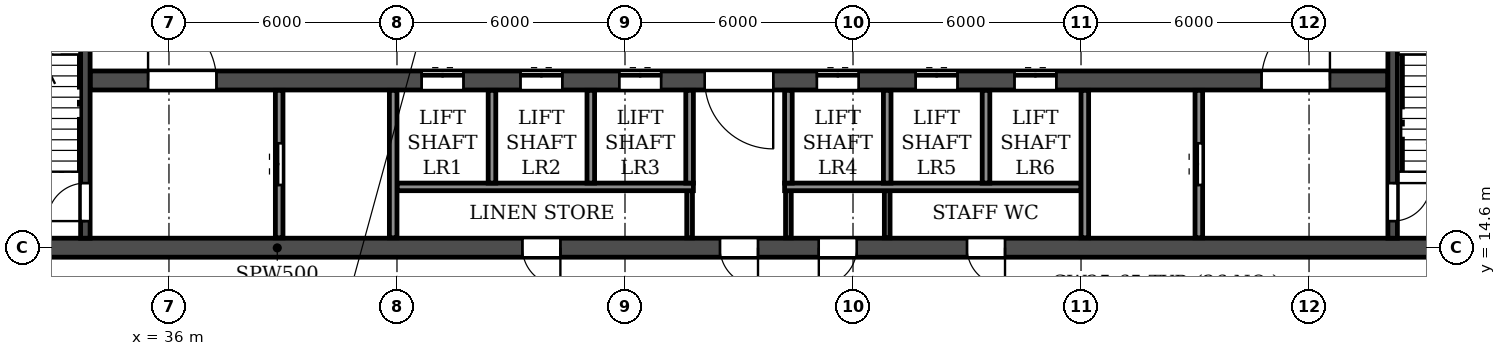
"""IFC4 building model, lengths in metres.
Left out: names, types, materials, properties, quantities, classifications, styles, units other than length and angle.
Written with IfcOpenShell. Run it as: python <this file> out.ifc"""

import sys

from ifc_helpers import new_model, si_unit, direction, frame, frame_2d, origin, place, context, subcontext, project, spatial, rectangle, extrude, element, fill, save


model = new_model("IFC4")
c1 = context("Model", 3, precision=1e-05, world=origin(), true_north=direction((0.0, 1.0)))
c2 = subcontext(c1, "Body", "Model", "MODEL_VIEW")
j1 = project(units=[si_unit("LENGTHUNIT", "METRE"), si_unit("PLANEANGLEUNIT", "RADIAN")], contexts=[c1])
p1 = place(None, origin())
s1 = spatial("IfcSite", under=j1, at=p1, CompositionType="ELEMENT")
p2 = place(p1, origin())
s2 = spatial("IfcBuilding", under=s1, at=p2, CompositionType="ELEMENT")
p3 = place(p2, frame((0.0, 0.0, 82.8)))
s3 = spatial("IfcBuildingStorey", under=s2, at=p3, CompositionType="ELEMENT", Elevation=82.8)
p4 = place(p3, frame((8.6, 14.6, 0.0), z_axis=(0.0, 0.0, 1.0), x_axis=(1.0, 0.0, 0.0)))
e1 = element("IfcWall", 1, at=p4, inside=s3, PredefinedType="SOLIDWALL", context=c2, shape_type="SweptSolid", body=[
    extrude(rectangle(XDim=84.8, YDim=0.5, at=frame_2d((42.4, 0.0))), origin(), (0.0, 0.0, 1.0), 3.06),
])
p5 = place(p4, frame((1.2, 0.0, 0.0)))
e2 = element("IfcOpeningElement", 2, at=p5, cuts=e1, PredefinedType="OPENING", context=c2, shape_type="SweptSolid", body=[
    extrude(rectangle(XDim=1.0, YDim=2.1, at=frame_2d((0.5, 1.05))), frame((0.0, 0.26, 0.0), z_axis=(0.0, -1.0, 0.0), x_axis=(1.0, 0.0, 0.0)), (0.0, 0.0, 1.0), 0.52),
])
p6 = place(p4, frame((5.9, 0.0, 0.0)))
e3 = element("IfcOpeningElement", 3, at=p6, cuts=e1, PredefinedType="OPENING", context=c2, shape_type="SweptSolid", body=[
    extrude(rectangle(XDim=1.0, YDim=2.1, at=frame_2d((0.5, 1.05))), frame((0.0, 0.26, 0.0), z_axis=(0.0, -1.0, 0.0), x_axis=(1.0, 0.0, 0.0)), (0.0, 0.0, 1.0), 0.52),
])
p7 = place(p4, frame((10.3, 0.0, 0.0)))
e4 = element("IfcOpeningElement", 4, at=p7, cuts=e1, PredefinedType="OPENING", context=c2, shape_type="SweptSolid", body=[
    extrude(rectangle(XDim=1.0, YDim=2.1, at=frame_2d((0.5, 1.05))), frame((0.0, 0.26, 0.0), z_axis=(0.0, -1.0, 0.0), x_axis=(1.0, 0.0, 0.0)), (0.0, 0.0, 1.0), 0.52),
])
p8 = place(p4, frame((18.2, 0.0, 0.0)))
e5 = element("IfcOpeningElement", 5, at=p8, cuts=e1, PredefinedType="OPENING", context=c2, shape_type="SweptSolid", body=[
    extrude(rectangle(XDim=1.0, YDim=2.1, at=frame_2d((0.5, 1.05))), frame((0.0, 0.26, 0.0), z_axis=(0.0, -1.0, 0.0), x_axis=(1.0, 0.0, 0.0)), (0.0, 0.0, 1.0), 0.52),
])
p9 = place(p4, frame((22.8, 0.0, 0.0)))
e6 = element("IfcOpeningElement", 6, at=p9, cuts=e1, PredefinedType="OPENING", context=c2, shape_type="SweptSolid", body=[
    extrude(rectangle(XDim=1.0, YDim=2.1, at=frame_2d((0.5, 1.05))), frame((0.0, 0.26, 0.0), z_axis=(0.0, -1.0, 0.0), x_axis=(1.0, 0.0, 0.0)), (0.0, 0.0, 1.0), 0.52),
])
p10 = place(p4, frame((36.7, 0.0, 0.0)))
e7 = element("IfcOpeningElement", 7, at=p10, cuts=e1, PredefinedType="OPENING", context=c2, shape_type="SweptSolid", body=[
    extrude(rectangle(XDim=1.0, YDim=2.1, at=frame_2d((0.5, 1.05))), frame((0.0, 0.26, 0.0), z_axis=(0.0, -1.0, 0.0), x_axis=(1.0, 0.0, 0.0)), (0.0, 0.0, 1.0), 0.52),
])
p11 = place(p4, frame((41.9, 0.0, 0.0)))
e8 = element("IfcOpeningElement", 8, at=p11, cuts=e1, PredefinedType="OPENING", context=c2, shape_type="SweptSolid", body=[
    extrude(rectangle(XDim=1.0, YDim=2.1, at=frame_2d((0.5, 1.05))), frame((0.0, 0.26, 0.0), z_axis=(0.0, -1.0, 0.0), x_axis=(1.0, 0.0, 0.0)), (0.0, 0.0, 1.0), 0.52),
])
p12 = place(p4, frame((44.5, 0.0, 0.0)))
e9 = element("IfcOpeningElement", 9, at=p12, cuts=e1, PredefinedType="OPENING", context=c2, shape_type="SweptSolid", body=[
    extrude(rectangle(XDim=1.0, YDim=2.1, at=frame_2d((0.5, 1.05))), frame((0.0, 0.26, 0.0), z_axis=(0.0, -1.0, 0.0), x_axis=(1.0, 0.0, 0.0)), (0.0, 0.0, 1.0), 0.52),
])
p13 = place(p4, frame((48.4, 0.0, 0.0)))
e10 = element("IfcOpeningElement", 10, at=p13, cuts=e1, PredefinedType="OPENING", context=c2, shape_type="SweptSolid", body=[
    extrude(rectangle(XDim=1.0, YDim=2.1, at=frame_2d((0.5, 1.05))), frame((0.0, 0.26, 0.0), z_axis=(0.0, -1.0, 0.0), x_axis=(1.0, 0.0, 0.0)), (0.0, 0.0, 1.0), 0.52),
])
p14 = place(p4, frame((61.0, 0.0, 0.0)))
e11 = element("IfcOpeningElement", 11, at=p14, cuts=e1, PredefinedType="OPENING", context=c2, shape_type="SweptSolid", body=[
    extrude(rectangle(XDim=1.0, YDim=2.1, at=frame_2d((0.5, 1.05))), frame((0.0, 0.26, 0.0), z_axis=(0.0, -1.0, 0.0), x_axis=(1.0, 0.0, 0.0)), (0.0, 0.0, 1.0), 0.52),
])
p15 = place(p4, frame((65.6, 0.0, 0.0)))
e12 = element("IfcOpeningElement", 12, at=p15, cuts=e1, PredefinedType="OPENING", context=c2, shape_type="SweptSolid", body=[
    extrude(rectangle(XDim=1.0, YDim=2.1, at=frame_2d((0.5, 1.05))), frame((0.0, 0.26, 0.0), z_axis=(0.0, -1.0, 0.0), x_axis=(1.0, 0.0, 0.0)), (0.0, 0.0, 1.0), 0.52),
])
p16 = place(p4, frame((73.5, 0.0, 0.0)))
e13 = element("IfcOpeningElement", 13, at=p16, cuts=e1, PredefinedType="OPENING", context=c2, shape_type="SweptSolid", body=[
    extrude(rectangle(XDim=1.0, YDim=2.1, at=frame_2d((0.5, 1.05))), frame((0.0, 0.26, 0.0), z_axis=(0.0, -1.0, 0.0), x_axis=(1.0, 0.0, 0.0)), (0.0, 0.0, 1.0), 0.52),
])
p17 = place(p4, frame((77.3, 0.0, 0.0)))
e14 = element("IfcOpeningElement", 14, at=p17, cuts=e1, PredefinedType="OPENING", context=c2, shape_type="SweptSolid", body=[
    extrude(rectangle(XDim=1.0, YDim=2.1, at=frame_2d((0.5, 1.05))), frame((0.0, 0.26, 0.0), z_axis=(0.0, -1.0, 0.0), x_axis=(1.0, 0.0, 0.0)), (0.0, 0.0, 1.0), 0.52),
])
p18 = place(p4, frame((82.0, 0.0, 0.0)))
e15 = element("IfcOpeningElement", 15, at=p18, cuts=e1, PredefinedType="OPENING", context=c2, shape_type="SweptSolid", body=[
    extrude(rectangle(XDim=1.0, YDim=2.1, at=frame_2d((0.5, 1.05))), frame((0.0, 0.26, 0.0), z_axis=(0.0, -1.0, 0.0), x_axis=(1.0, 0.0, 0.0)), (0.0, 0.0, 1.0), 0.52),
])
p19 = place(p3, frame((33.925, 19.0, 0.0), z_axis=(0.0, 0.0, 1.0), x_axis=(1.0, 0.0, 0.0)))
e16 = element("IfcWall", 16, at=p19, inside=s3, PredefinedType="SOLIDWALL", context=c2, shape_type="SweptSolid", body=[
    extrude(rectangle(XDim=34.15, YDim=0.5, at=frame_2d((17.075, 0.0))), origin(), (0.0, 0.0, 1.0), 3.06),
])
p20 = place(p19, frame((16.175, 0.0, 0.0)))
e17 = element("IfcOpeningElement", 17, at=p20, cuts=e16, PredefinedType="OPENING", context=c2, shape_type="SweptSolid", body=[
    extrude(rectangle(XDim=1.8, YDim=2.1, at=frame_2d((0.9, 1.05))), frame((0.0, 0.26, 0.0), z_axis=(0.0, -1.0, 0.0), x_axis=(1.0, 0.0, 0.0)), (0.0, 0.0, 1.0), 0.52),
])
p21 = place(p19, frame((1.525, 0.0, 0.0)))
e18 = element("IfcOpeningElement", 18, at=p21, cuts=e16, PredefinedType="OPENING", context=c2, shape_type="SweptSolid", body=[
    extrude(rectangle(XDim=1.8, YDim=2.1, at=frame_2d((0.9, 1.05))), frame((0.0, 0.26, 0.0), z_axis=(0.0, -1.0, 0.0), x_axis=(1.0, 0.0, 0.0)), (0.0, 0.0, 1.0), 0.52),
])
p22 = place(p19, frame((8.725, 0.0, 0.0)))
e19 = element("IfcOpeningElement", 19, at=p22, cuts=e16, PredefinedType="OPENING", context=c2, shape_type="SweptSolid", body=[
    extrude(rectangle(XDim=1.1, YDim=2.1, at=frame_2d((0.55, 1.05))), frame((0.0, 0.26, 0.0), z_axis=(0.0, -1.0, 0.0), x_axis=(1.0, 0.0, 0.0)), (0.0, 0.0, 1.0), 0.52),
])
p23 = place(p19, frame((11.325, 0.0, 0.0)))
e20 = element("IfcOpeningElement", 20, at=p23, cuts=e16, PredefinedType="OPENING", context=c2, shape_type="SweptSolid", body=[
    extrude(rectangle(XDim=1.1, YDim=2.1, at=frame_2d((0.55, 1.05))), frame((0.0, 0.26, 0.0), z_axis=(0.0, -1.0, 0.0), x_axis=(1.0, 0.0, 0.0)), (0.0, 0.0, 1.0), 0.52),
])
p24 = place(p19, frame((13.925, 0.0, 0.0)))
e21 = element("IfcOpeningElement", 21, at=p24, cuts=e16, PredefinedType="OPENING", context=c2, shape_type="SweptSolid", body=[
    extrude(rectangle(XDim=1.1, YDim=2.1, at=frame_2d((0.55, 1.05))), frame((0.0, 0.26, 0.0), z_axis=(0.0, -1.0, 0.0), x_axis=(1.0, 0.0, 0.0)), (0.0, 0.0, 1.0), 0.52),
])
p25 = place(p19, frame((19.125, 0.0, 0.0)))
e22 = element("IfcOpeningElement", 22, at=p25, cuts=e16, PredefinedType="OPENING", context=c2, shape_type="SweptSolid", body=[
    extrude(rectangle(XDim=1.1, YDim=2.1, at=frame_2d((0.55, 1.05))), frame((0.0, 0.26, 0.0), z_axis=(0.0, -1.0, 0.0), x_axis=(1.0, 0.0, 0.0)), (0.0, 0.0, 1.0), 0.52),
])
p26 = place(p19, frame((21.725, 0.0, 0.0)))
e23 = element("IfcOpeningElement", 23, at=p26, cuts=e16, PredefinedType="OPENING", context=c2, shape_type="SweptSolid", body=[
    extrude(rectangle(XDim=1.1, YDim=2.1, at=frame_2d((0.55, 1.05))), frame((0.0, 0.26, 0.0), z_axis=(0.0, -1.0, 0.0), x_axis=(1.0, 0.0, 0.0)), (0.0, 0.0, 1.0), 0.52),
])
p27 = place(p19, frame((24.325, 0.0, 0.0)))
e24 = element("IfcOpeningElement", 24, at=p27, cuts=e16, PredefinedType="OPENING", context=c2, shape_type="SweptSolid", body=[
    extrude(rectangle(XDim=1.1, YDim=2.1, at=frame_2d((0.55, 1.05))), frame((0.0, 0.26, 0.0), z_axis=(0.0, -1.0, 0.0), x_axis=(1.0, 0.0, 0.0)), (0.0, 0.0, 1.0), 0.52),
])
p28 = place(p19, frame((30.825, 0.0, 0.0)))
e25 = element("IfcOpeningElement", 25, at=p28, cuts=e16, PredefinedType="OPENING", context=c2, shape_type="SweptSolid", body=[
    extrude(rectangle(XDim=1.8, YDim=2.1, at=frame_2d((0.9, 1.05))), frame((0.0, 0.26, 0.0), z_axis=(0.0, -1.0, 0.0), x_axis=(1.0, 0.0, 0.0)), (0.0, 0.0, 1.0), 0.52),
])
p29 = place(p3, frame((33.8, 14.85, 0.0), z_axis=(0.0, 0.0, 1.0), x_axis=(0.0, 1.0, 0.0)))
e26 = element("IfcWall", 26, at=p29, inside=s3, PredefinedType="SOLIDWALL", context=c2, shape_type="SweptSolid", body=[
    extrude(rectangle(XDim=7.625, YDim=0.25, at=frame_2d((3.812, 0.0))), origin(), (0.0, 0.0, 1.0), 3.06),
])
p30 = place(p29, frame((0.45, 0.0, 0.0)))
e27 = element("IfcOpeningElement", 27, at=p30, cuts=e26, PredefinedType="OPENING", context=c2, shape_type="SweptSolid", body=[
    extrude(rectangle(XDim=1.0, YDim=2.1, at=frame_2d((0.5, 1.05))), frame((0.0, 0.135, 0.0), z_axis=(0.0, -1.0, 0.0), x_axis=(1.0, 0.0, 0.0)), (0.0, 0.0, 1.0), 0.27),
])
p31 = place(p3, frame((68.2, 14.85, 0.0), z_axis=(0.0, 0.0, 1.0), x_axis=(0.0, 1.0, 0.0)))
e28 = element("IfcWall", 28, at=p31, inside=s3, PredefinedType="SOLIDWALL", context=c2, shape_type="SweptSolid", body=[
    extrude(rectangle(XDim=7.625, YDim=0.25, at=frame_2d((3.812, 0.0))), origin(), (0.0, 0.0, 1.0), 3.06),
])
p32 = place(p31, frame((0.45, 0.0, 0.0)))
e29 = element("IfcOpeningElement", 29, at=p32, cuts=e28, PredefinedType="OPENING", context=c2, shape_type="SweptSolid", body=[
    extrude(rectangle(XDim=1.0, YDim=2.1, at=frame_2d((0.5, 1.05))), frame((0.0, 0.135, 0.0), z_axis=(0.0, -1.0, 0.0), x_axis=(1.0, 0.0, 0.0)), (0.0, 0.0, 1.0), 0.27),
])
for number, where, z_axis, x_axis in (
    (30, (49.7, 14.86, 0.0), (0.0, 0.0, 1.0), (0.0, 1.0, 0.0)),
    (31, (52.3, 14.86, 0.0), (0.0, 0.0, 1.0), (0.0, 1.0, 0.0)),
    (32, (54.9, 14.86, 0.0), (0.0, 0.0, 1.0), (0.0, 1.0, 0.0)),
):
    element("IfcWall", number, at=place(p3, frame(where, z_axis=z_axis, x_axis=x_axis)), inside=s3, PredefinedType="PARTITIONING", context=c2, shape_type="SweptSolid", body=[
        extrude(rectangle(XDim=1.24, YDim=0.15, at=frame_2d((0.62, 0.0))), origin(), (0.0, 0.0, 1.0), 3.06),
    ])
for number, where, z_axis, x_axis in (
    (33, (42.0, 16.2, 0.0), (0.0, 0.0, 1.0), (1.0, 0.0, 0.0)),
    (34, (52.2, 16.2, 0.0), (0.0, 0.0, 1.0), (1.0, 0.0, 0.0)),
):
    element("IfcWall", number, at=place(p3, frame(where, z_axis=z_axis, x_axis=x_axis)), inside=s3, PredefinedType="PARTITIONING", context=c2, shape_type="SweptSolid", body=[
        extrude(rectangle(XDim=7.8, YDim=0.2, at=frame_2d((3.9, 0.0))), origin(), (0.0, 0.0, 1.0), 3.06),
    ])
p33 = place(p3, frame((38.9, 14.86, 0.0), z_axis=(0.0, 0.0, 1.0), x_axis=(0.0, 1.0, 0.0)))
e35 = element("IfcWall", 35, at=p33, inside=s3, PredefinedType="PARTITIONING", context=c2, shape_type="SweptSolid", body=[
    extrude(rectangle(XDim=3.88, YDim=0.2, at=frame_2d((1.94, 0.0))), origin(), (0.0, 0.0, 1.0), 3.06),
])
p34 = place(p33, frame((1.39, 0.0, 0.0)))
e36 = element("IfcOpeningElement", 36, at=p34, cuts=e35, PredefinedType="OPENING", context=c2, shape_type="SweptSolid", body=[
    extrude(rectangle(XDim=1.1, YDim=2.1, at=frame_2d((0.55, 1.05))), frame((0.0, 0.11, 0.0), z_axis=(0.0, -1.0, 0.0), x_axis=(1.0, 0.0, 0.0)), (0.0, 0.0, 1.0), 0.22),
])
p35 = place(p3, frame((41.9, 14.86, 0.0), z_axis=(0.0, 0.0, 1.0), x_axis=(0.0, 1.0, 0.0)))
e37 = element("IfcWall", 37, at=p35, inside=s3, PredefinedType="PARTITIONING", context=c2, shape_type="SweptSolid", body=[
    extrude(rectangle(XDim=3.88, YDim=0.2, at=frame_2d((1.94, 0.0))), origin(), (0.0, 0.0, 1.0), 3.06),
])
for number, where, z_axis, x_axis in (
    (38, (44.5, 16.3, 0.0), (0.0, 0.0, 1.0), (0.0, 1.0, 0.0)),
    (39, (47.1, 16.3, 0.0), (0.0, 0.0, 1.0), (0.0, 1.0, 0.0)),
    (40, (49.7, 16.3, 0.0), (0.0, 0.0, 1.0), (0.0, 1.0, 0.0)),
    (41, (52.3, 16.3, 0.0), (0.0, 0.0, 1.0), (0.0, 1.0, 0.0)),
    (42, (54.9, 16.3, 0.0), (0.0, 0.0, 1.0), (0.0, 1.0, 0.0)),
    (43, (57.5, 16.3, 0.0), (0.0, 0.0, 1.0), (0.0, 1.0, 0.0)),
):
    element("IfcWall", number, at=place(p3, frame(where, z_axis=z_axis, x_axis=x_axis)), inside=s3, PredefinedType="PARTITIONING", context=c2, shape_type="SweptSolid", body=[
        extrude(rectangle(XDim=2.44, YDim=0.2, at=frame_2d((1.22, 0.0))), origin(), (0.0, 0.0, 1.0), 3.06),
    ])
p36 = place(p3, frame((60.1, 14.86, 0.0), z_axis=(0.0, 0.0, 1.0), x_axis=(0.0, 1.0, 0.0)))
e44 = element("IfcWall", 44, at=p36, inside=s3, PredefinedType="PARTITIONING", context=c2, shape_type="SweptSolid", body=[
    extrude(rectangle(XDim=3.88, YDim=0.2, at=frame_2d((1.94, 0.0))), origin(), (0.0, 0.0, 1.0), 3.06),
])
p37 = place(p3, frame((63.1, 14.86, 0.0), z_axis=(0.0, 0.0, 1.0), x_axis=(0.0, 1.0, 0.0)))
e45 = element("IfcWall", 45, at=p37, inside=s3, PredefinedType="PARTITIONING", context=c2, shape_type="SweptSolid", body=[
    extrude(rectangle(XDim=3.88, YDim=0.2, at=frame_2d((1.94, 0.0))), origin(), (0.0, 0.0, 1.0), 3.06),
])
p38 = place(p37, frame((1.39, 0.0, 0.0)))
e46 = element("IfcOpeningElement", 46, at=p38, cuts=e45, PredefinedType="OPENING", context=c2, shape_type="SweptSolid", body=[
    extrude(rectangle(XDim=1.1, YDim=2.1, at=frame_2d((0.55, 1.05))), frame((0.0, 0.11, 0.0), z_axis=(0.0, -1.0, 0.0), x_axis=(1.0, 0.0, 0.0)), (0.0, 0.0, 1.0), 0.22),
])
p39 = place(p10, frame((1.0, 0.0, 0.0), z_axis=(0.0, 0.0, 1.0), x_axis=(-1.0, 0.0, 0.0)))
e47 = element("IfcDoor", 47, at=p39, inside=s3, OperationType="SINGLE_SWING_LEFT", PredefinedType="DOOR", context=c2, shape_type="SweptSolid", body=[
    extrude(rectangle(XDim=1.0, YDim=2.1, at=frame_2d((0.5, 1.05))), frame((0.0, 0.025, 0.0), z_axis=(0.0, -1.0, 0.0), x_axis=(1.0, 0.0, 0.0)), (0.0, 0.0, 1.0), 0.05),
])
fill(e7, e47)
p40 = place(p11, frame((1.0, 0.0, 0.0), z_axis=(0.0, 0.0, 1.0), x_axis=(-1.0, 0.0, 0.0)))
e48 = element("IfcDoor", 48, at=p40, inside=s3, OperationType="SINGLE_SWING_LEFT", PredefinedType="DOOR", context=c2, shape_type="SweptSolid", body=[
    extrude(rectangle(XDim=1.0, YDim=2.1, at=frame_2d((0.5, 1.05))), frame((0.0, 0.025, 0.0), z_axis=(0.0, -1.0, 0.0), x_axis=(1.0, 0.0, 0.0)), (0.0, 0.0, 1.0), 0.05),
])
fill(e8, e48)
p41 = place(p12, frame((1.0, 0.0, 0.0), z_axis=(0.0, 0.0, 1.0), x_axis=(-1.0, 0.0, 0.0)))
e49 = element("IfcDoor", 49, at=p41, inside=s3, OperationType="SINGLE_SWING_RIGHT", PredefinedType="DOOR", context=c2, shape_type="SweptSolid", body=[
    extrude(rectangle(XDim=1.0, YDim=2.1, at=frame_2d((0.5, 1.05))), frame((0.0, 0.025, 0.0), z_axis=(0.0, -1.0, 0.0), x_axis=(1.0, 0.0, 0.0)), (0.0, 0.0, 1.0), 0.05),
])
fill(e9, e49)
p42 = place(p13, frame((1.0, 0.0, 0.0), z_axis=(0.0, 0.0, 1.0), x_axis=(-1.0, 0.0, 0.0)))
e50 = element("IfcDoor", 50, at=p42, inside=s3, OperationType="SINGLE_SWING_LEFT", PredefinedType="DOOR", context=c2, shape_type="SweptSolid", body=[
    extrude(rectangle(XDim=1.0, YDim=2.1, at=frame_2d((0.5, 1.05))), frame((0.0, 0.025, 0.0), z_axis=(0.0, -1.0, 0.0), x_axis=(1.0, 0.0, 0.0)), (0.0, 0.0, 1.0), 0.05),
])
fill(e10, e50)
p43 = place(p38, origin())
e51 = element("IfcDoor", 51, at=p43, inside=s3, OperationType="DOUBLE_DOOR_SLIDING", PredefinedType="DOOR", context=c2, shape_type="SweptSolid", body=[
    extrude(rectangle(XDim=1.1, YDim=2.1, at=frame_2d((0.55, 1.05))), frame((0.0, 0.025, 0.0), z_axis=(0.0, -1.0, 0.0), x_axis=(1.0, 0.0, 0.0)), (0.0, 0.0, 1.0), 0.05),
])
fill(e46, e51)
p44 = place(p32, frame((1.0, 0.0, 0.0), z_axis=(0.0, 0.0, 1.0), x_axis=(-1.0, 0.0, 0.0)))
e52 = element("IfcDoor", 52, at=p44, inside=s3, OperationType="SINGLE_SWING_LEFT", PredefinedType="DOOR", context=c2, shape_type="SweptSolid", body=[
    extrude(rectangle(XDim=1.0, YDim=2.1, at=frame_2d((0.5, 1.05))), frame((0.0, 0.025, 0.0), z_axis=(0.0, -1.0, 0.0), x_axis=(1.0, 0.0, 0.0)), (0.0, 0.0, 1.0), 0.05),
])
fill(e29, e52)
p45 = place(p30, origin())
e53 = element("IfcDoor", 53, at=p45, inside=s3, OperationType="SINGLE_SWING_LEFT", PredefinedType="DOOR", context=c2, shape_type="SweptSolid", body=[
    extrude(rectangle(XDim=1.0, YDim=2.1, at=frame_2d((0.5, 1.05))), frame((0.0, 0.025, 0.0), z_axis=(0.0, -1.0, 0.0), x_axis=(1.0, 0.0, 0.0)), (0.0, 0.0, 1.0), 0.05),
])
fill(e27, e53)
p46 = place(p34, origin())
e54 = element("IfcDoor", 54, at=p46, inside=s3, OperationType="DOUBLE_DOOR_SLIDING", PredefinedType="DOOR", context=c2, shape_type="SweptSolid", body=[
    extrude(rectangle(XDim=1.1, YDim=2.1, at=frame_2d((0.55, 1.05))), frame((0.0, 0.025, 0.0), z_axis=(0.0, -1.0, 0.0), x_axis=(1.0, 0.0, 0.0)), (0.0, 0.0, 1.0), 0.05),
])
fill(e36, e54)
p47 = place(p20, frame((1.8, 0.0, 0.0), z_axis=(0.0, 0.0, 1.0), x_axis=(-1.0, 0.0, 0.0)))
e55 = element("IfcDoor", 55, at=p47, inside=s3, OperationType="DOUBLE_DOOR_SINGLE_SWING", PredefinedType="DOOR", context=c2, shape_type="SweptSolid", body=[
    extrude(rectangle(XDim=1.8, YDim=2.1, at=frame_2d((0.9, 1.05))), frame((0.0, 0.025, 0.0), z_axis=(0.0, -1.0, 0.0), x_axis=(1.0, 0.0, 0.0)), (0.0, 0.0, 1.0), 0.05),
])
fill(e17, e55)
p48 = place(p21, origin())
e56 = element("IfcDoor", 56, at=p48, inside=s3, OperationType="DOUBLE_DOOR_SINGLE_SWING", PredefinedType="DOOR", context=c2, shape_type="SweptSolid", body=[
    extrude(rectangle(XDim=1.8, YDim=2.1, at=frame_2d((0.9, 1.05))), frame((0.0, 0.025, 0.0), z_axis=(0.0, -1.0, 0.0), x_axis=(1.0, 0.0, 0.0)), (0.0, 0.0, 1.0), 0.05),
])
fill(e18, e56)
p49 = place(p22, origin())
e57 = element("IfcDoor", 57, at=p49, inside=s3, OperationType="DOUBLE_DOOR_SLIDING", PredefinedType="DOOR", context=c2, shape_type="SweptSolid", body=[
    extrude(rectangle(XDim=1.1, YDim=2.1, at=frame_2d((0.55, 1.05))), frame((0.0, 0.025, 0.0), z_axis=(0.0, -1.0, 0.0), x_axis=(1.0, 0.0, 0.0)), (0.0, 0.0, 1.0), 0.05),
])
fill(e19, e57)
p50 = place(p23, origin())
e58 = element("IfcDoor", 58, at=p50, inside=s3, OperationType="DOUBLE_DOOR_SLIDING", PredefinedType="DOOR", context=c2, shape_type="SweptSolid", body=[
    extrude(rectangle(XDim=1.1, YDim=2.1, at=frame_2d((0.55, 1.05))), frame((0.0, 0.025, 0.0), z_axis=(0.0, -1.0, 0.0), x_axis=(1.0, 0.0, 0.0)), (0.0, 0.0, 1.0), 0.05),
])
fill(e20, e58)
p51 = place(p24, origin())
e59 = element("IfcDoor", 59, at=p51, inside=s3, OperationType="DOUBLE_DOOR_SLIDING", PredefinedType="DOOR", context=c2, shape_type="SweptSolid", body=[
    extrude(rectangle(XDim=1.1, YDim=2.1, at=frame_2d((0.55, 1.05))), frame((0.0, 0.025, 0.0), z_axis=(0.0, -1.0, 0.0), x_axis=(1.0, 0.0, 0.0)), (0.0, 0.0, 1.0), 0.05),
])
fill(e21, e59)
p52 = place(p25, origin())
e60 = element("IfcDoor", 60, at=p52, inside=s3, OperationType="DOUBLE_DOOR_SLIDING", PredefinedType="DOOR", context=c2, shape_type="SweptSolid", body=[
    extrude(rectangle(XDim=1.1, YDim=2.1, at=frame_2d((0.55, 1.05))), frame((0.0, 0.025, 0.0), z_axis=(0.0, -1.0, 0.0), x_axis=(1.0, 0.0, 0.0)), (0.0, 0.0, 1.0), 0.05),
])
fill(e22, e60)
p53 = place(p26, origin())
e61 = element("IfcDoor", 61, at=p53, inside=s3, OperationType="DOUBLE_DOOR_SLIDING", PredefinedType="DOOR", context=c2, shape_type="SweptSolid", body=[
    extrude(rectangle(XDim=1.1, YDim=2.1, at=frame_2d((0.55, 1.05))), frame((0.0, 0.025, 0.0), z_axis=(0.0, -1.0, 0.0), x_axis=(1.0, 0.0, 0.0)), (0.0, 0.0, 1.0), 0.05),
])
fill(e23, e61)
p54 = place(p27, origin())
e62 = element("IfcDoor", 62, at=p54, inside=s3, OperationType="DOUBLE_DOOR_SLIDING", PredefinedType="DOOR", context=c2, shape_type="SweptSolid", body=[
    extrude(rectangle(XDim=1.1, YDim=2.1, at=frame_2d((0.55, 1.05))), frame((0.0, 0.025, 0.0), z_axis=(0.0, -1.0, 0.0), x_axis=(1.0, 0.0, 0.0)), (0.0, 0.0, 1.0), 0.05),
])
fill(e24, e62)
p55 = place(p28, origin())
e63 = element("IfcDoor", 63, at=p55, inside=s3, OperationType="DOUBLE_DOOR_SINGLE_SWING", PredefinedType="DOOR", context=c2, shape_type="SweptSolid", body=[
    extrude(rectangle(XDim=1.8, YDim=2.1, at=frame_2d((0.9, 1.05))), frame((0.0, 0.025, 0.0), z_axis=(0.0, -1.0, 0.0), x_axis=(1.0, 0.0, 0.0)), (0.0, 0.0, 1.0), 0.05),
])
fill(e25, e63)
save(model, sys.argv[1])
